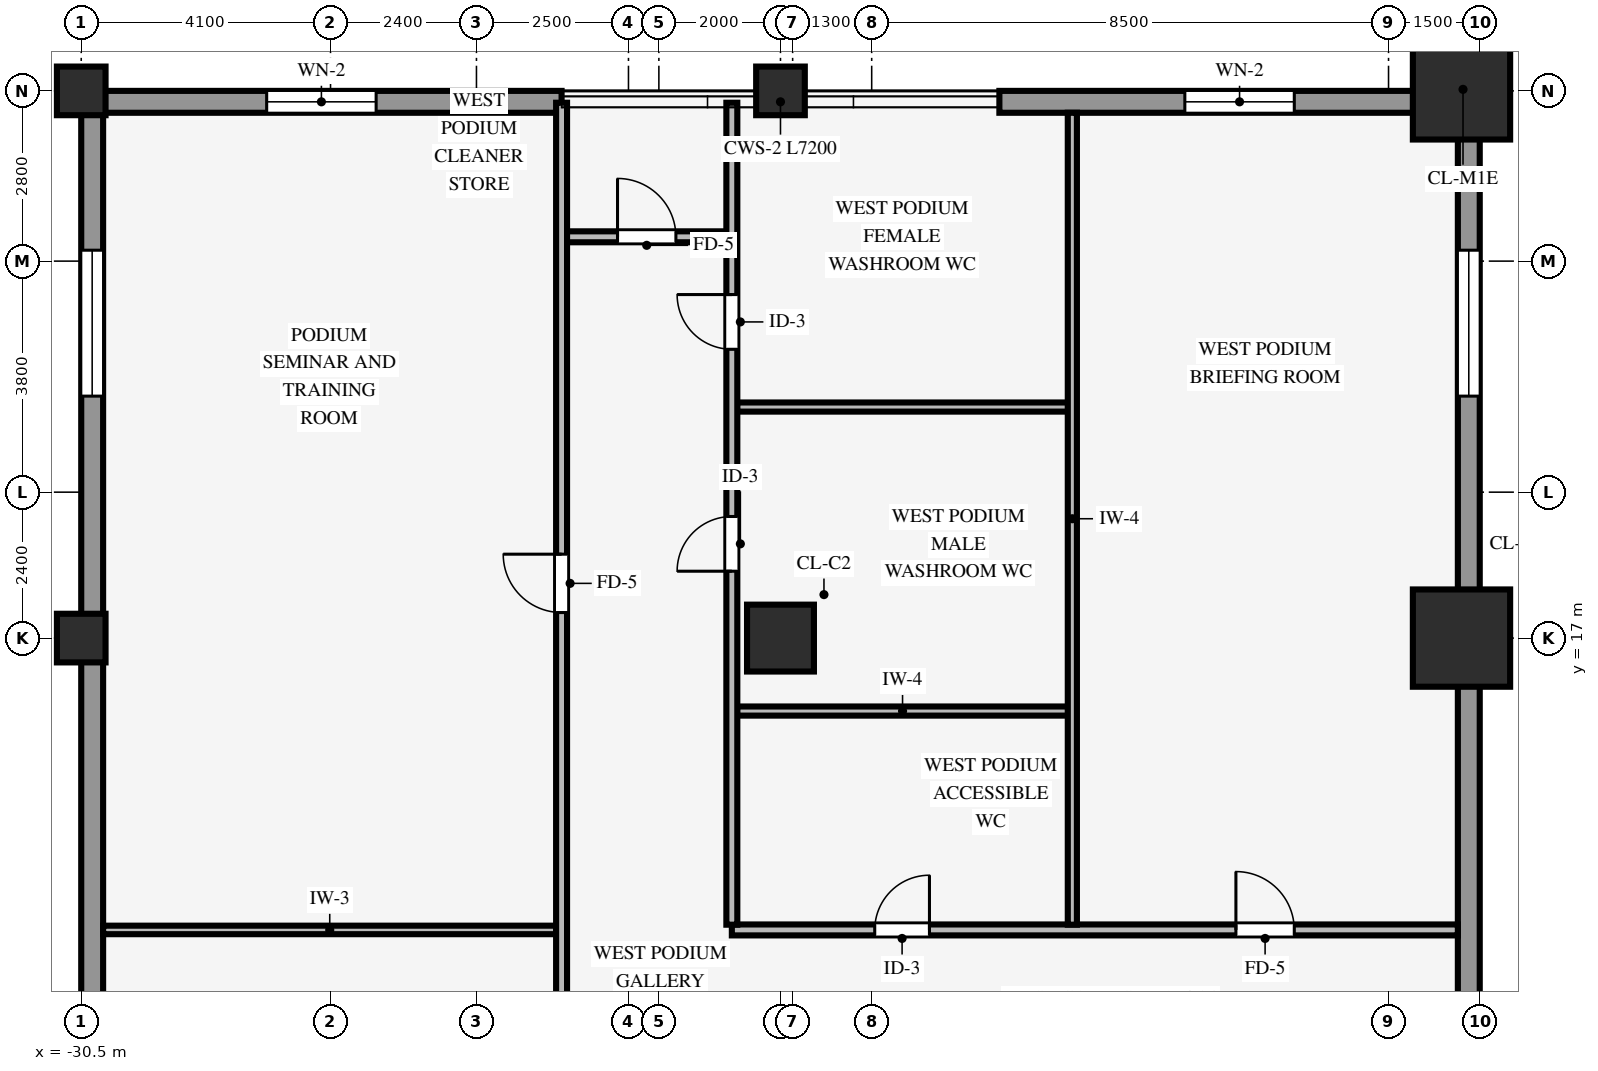
"""IFC4 building model, lengths in metres.
Left out: names, types, materials, properties, quantities, classifications, styles, units other than length and angle.
Written with IfcOpenShell. Run it as: python <this file> out.ifc"""

import sys

from ifc_helpers import new_model, si_unit, direction, frame, frame_2d, origin, origin_2d, place, context, subcontext, project, spatial, rectangle, hollow_rectangle, extrude, source, transform, mapped, element, fill, save


model = new_model("IFC4")
c1 = context("Model", 3, precision=1e-05, world=origin(), true_north=direction((0.0, 1.0)))
c2 = subcontext(c1, "Body", "Model", "MODEL_VIEW")
j1 = project(units=[si_unit("LENGTHUNIT", "METRE"), si_unit("PLANEANGLEUNIT", "RADIAN")], contexts=[c1])
p1 = place(None, origin())
s1 = spatial("IfcSite", under=j1, at=p1, CompositionType="ELEMENT")
p2 = place(p1, origin())
s2 = spatial("IfcBuilding", under=s1, at=p2, CompositionType="ELEMENT")
p3 = place(p2, frame((0.0, 0.0, 9.2)))
s3 = spatial("IfcBuildingStorey", under=s2, at=p3, CompositionType="ELEMENT", Elevation=9.2)
for number, where, z_axis, x_axis in (
    (1, (-7.8, 17.0, 0.0), (0.0, 0.0, 1.0), (1.0, 0.0, 0.0)),
    (2, (-7.8, 26.0, 0.0), (0.0, 0.0, 1.0), (1.0, 0.0, 0.0)),
):
    element("IfcColumn", number, at=place(p3, frame(where, z_axis=z_axis, x_axis=x_axis)), inside=s3, PredefinedType="COLUMN", context=c2, shape_type="SweptSolid", body=[
        extrude(rectangle(XDim=1.6, YDim=1.6, at=origin_2d()), origin(), (0.0, 0.0, 1.0), 4.28),
    ])
for number, where, z_axis, x_axis in (
    (3, (-30.5, 17.0, 0.0), (0.0, 0.0, 1.0), (1.0, 0.0, 0.0)),
    (4, (-30.5, 26.0, 0.0), (0.0, 0.0, 1.0), (1.0, 0.0, 0.0)),
):
    element("IfcColumn", number, at=place(p3, frame(where, z_axis=z_axis, x_axis=x_axis)), inside=s3, PredefinedType="COLUMN", context=c2, shape_type="SweptSolid", body=[
        extrude(hollow_rectangle(XDim=0.8, YDim=0.8, WallThickness=0.055, InnerFilletRadius=0.055, OuterFilletRadius=0.11, at=origin_2d()), origin(), (0.0, 0.0, 1.0), 4.28),
    ])
p4 = place(p3, frame((-19.0, 17.0, 0.0), z_axis=(0.0, 0.0, 1.0), x_axis=(1.0, 0.0, 0.0)))
e5 = element("IfcColumn", 5, at=p4, inside=s3, PredefinedType="COLUMN", context=c2, shape_type="SweptSolid", body=[
    extrude(rectangle(XDim=1.1, YDim=1.1, at=origin_2d()), origin(), (0.0, 0.0, 1.0), 4.28),
])
p5 = place(p3, frame((-19.0, 26.0, 0.0), z_axis=(0.0, 0.0, 1.0), x_axis=(1.0, 0.0, 0.0)))
e6 = element("IfcColumn", 6, at=p5, inside=s3, PredefinedType="COLUMN", context=c2, shape_type="SweptSolid", body=[
    extrude(hollow_rectangle(XDim=0.8, YDim=0.8, WallThickness=0.055, InnerFilletRadius=0.055, OuterFilletRadius=0.11, at=origin_2d()), origin(), (0.0, 0.0, 1.0), 4.28),
])
p6 = place(p3, frame((-7.68, -25.644, 0.0), z_axis=(0.0, 0.0, 1.0), x_axis=(0.0, 1.0, 0.0)))
e7 = element("IfcWall", 7, at=p6, inside=s3, PredefinedType="STANDARD", context=c2, shape_type="SweptSolid", body=[
    extrude(rectangle(XDim=51.288, YDim=0.36, at=frame_2d((25.644, 0.0))), origin(), (0.0, 0.0, 1.0), 3.649),
])
p7 = place(p6, frame((2.264, 0.0, 0.85)))
e8 = element("IfcOpeningElement", 8, at=p7, cuts=e7, PredefinedType="OPENING", context=c2, shape_type="SweptSolid", body=[
    extrude(rectangle(XDim=2.4, YDim=2.45, at=frame_2d((1.2, 1.225))), frame((0.0, 0.19, 0.0), z_axis=(0.0, -1.0, 0.0), x_axis=(1.0, 0.0, 0.0)), (0.0, 0.0, 1.0), 0.38),
])
p8 = place(p6, frame((17.051, 0.0, 0.85)))
e9 = element("IfcOpeningElement", 9, at=p8, cuts=e7, PredefinedType="OPENING", context=c2, shape_type="SweptSolid", body=[
    extrude(rectangle(XDim=2.4, YDim=2.45, at=frame_2d((1.2, 1.225))), frame((0.0, 0.19, 0.0), z_axis=(0.0, -1.0, 0.0), x_axis=(1.0, 0.0, 0.0)), (0.0, 0.0, 1.0), 0.38),
])
p9 = place(p6, frame((21.979, 0.0, 0.85)))
e10 = element("IfcOpeningElement", 10, at=p9, cuts=e7, PredefinedType="OPENING", context=c2, shape_type="SweptSolid", body=[
    extrude(rectangle(XDim=2.4, YDim=2.45, at=frame_2d((1.2, 1.225))), frame((0.0, 0.19, 0.0), z_axis=(0.0, -1.0, 0.0), x_axis=(1.0, 0.0, 0.0)), (0.0, 0.0, 1.0), 0.38),
])
p10 = place(p6, frame((26.908, 0.0, 0.85)))
e11 = element("IfcOpeningElement", 11, at=p10, cuts=e7, PredefinedType="OPENING", context=c2, shape_type="SweptSolid", body=[
    extrude(rectangle(XDim=2.4, YDim=2.45, at=frame_2d((1.2, 1.225))), frame((0.0, 0.19, 0.0), z_axis=(0.0, -1.0, 0.0), x_axis=(1.0, 0.0, 0.0)), (0.0, 0.0, 1.0), 0.38),
])
p11 = place(p6, frame((31.837, 0.0, 0.85)))
e12 = element("IfcOpeningElement", 12, at=p11, cuts=e7, PredefinedType="OPENING", context=c2, shape_type="SweptSolid", body=[
    extrude(rectangle(XDim=2.4, YDim=2.45, at=frame_2d((1.2, 1.225))), frame((0.0, 0.19, 0.0), z_axis=(0.0, -1.0, 0.0), x_axis=(1.0, 0.0, 0.0)), (0.0, 0.0, 1.0), 0.38),
])
p12 = place(p6, frame((46.624, 0.0, 0.85)))
e13 = element("IfcOpeningElement", 13, at=p12, cuts=e7, PredefinedType="OPENING", context=c2, shape_type="SweptSolid", body=[
    extrude(rectangle(XDim=2.4, YDim=2.45, at=frame_2d((1.2, 1.225))), frame((0.0, 0.19, 0.0), z_axis=(0.0, -1.0, 0.0), x_axis=(1.0, 0.0, 0.0)), (0.0, 0.0, 1.0), 0.38),
])
p13 = place(p3, frame((-30.5, 25.82, 0.0), z_axis=(0.0, 0.0, 1.0), x_axis=(1.0, 0.0, 0.0)))
e14 = element("IfcWall", 14, at=p13, inside=s3, PredefinedType="STANDARD", context=c2, shape_type="SweptSolid", body=[
    extrude(rectangle(XDim=7.9, YDim=0.36, at=frame_2d((3.95, 0.0))), origin(), (0.0, 0.0, 1.0), 3.615),
])
p14 = place(p13, frame((3.05, 0.0, 0.85)))
e15 = element("IfcOpeningElement", 15, at=p14, cuts=e14, PredefinedType="OPENING", context=c2, shape_type="SweptSolid", body=[
    extrude(rectangle(XDim=1.8, YDim=2.35, at=frame_2d((0.9, 1.175))), frame((0.0, 0.19, 0.0), z_axis=(0.0, -1.0, 0.0), x_axis=(1.0, 0.0, 0.0)), (0.0, 0.0, 1.0), 0.38),
])
p15 = place(p3, frame((-15.4, 25.82, 0.0), z_axis=(0.0, 0.0, 1.0), x_axis=(1.0, 0.0, 0.0)))
e16 = element("IfcWall", 16, at=p15, inside=s3, PredefinedType="STANDARD", context=c2, shape_type="SweptSolid", body=[
    extrude(rectangle(XDim=7.9, YDim=0.36, at=frame_2d((3.95, 0.0))), origin(), (0.0, 0.0, 1.0), 3.615),
])
p16 = place(p15, frame((3.05, 0.0, 0.85)))
e17 = element("IfcOpeningElement", 17, at=p16, cuts=e16, PredefinedType="OPENING", context=c2, shape_type="SweptSolid", body=[
    extrude(rectangle(XDim=1.8, YDim=2.35, at=frame_2d((0.9, 1.175))), frame((0.0, 0.19, 0.0), z_axis=(0.0, -1.0, 0.0), x_axis=(1.0, 0.0, 0.0)), (0.0, 0.0, 1.0), 0.38),
])
p17 = place(p3, frame((-30.32, -25.644, 0.0), z_axis=(0.0, 0.0, 1.0), x_axis=(0.0, 1.0, 0.0)))
e18 = element("IfcWall", 18, at=p17, inside=s3, PredefinedType="STANDARD", context=c2, shape_type="SweptSolid", body=[
    extrude(rectangle(XDim=51.288, YDim=0.36, at=frame_2d((25.644, 0.0))), origin(), (0.0, 0.0, 1.0), 3.615),
])
p18 = place(p17, frame((2.264, 0.0, 0.85)))
e19 = element("IfcOpeningElement", 19, at=p18, cuts=e18, PredefinedType="OPENING", context=c2, shape_type="SweptSolid", body=[
    extrude(rectangle(XDim=2.4, YDim=2.45, at=frame_2d((1.2, 1.225))), frame((0.0, 0.19, 0.0), z_axis=(0.0, -1.0, 0.0), x_axis=(1.0, 0.0, 0.0)), (0.0, 0.0, 1.0), 0.38),
])
p19 = place(p17, frame((17.051, 0.0, 0.85)))
e20 = element("IfcOpeningElement", 20, at=p19, cuts=e18, PredefinedType="OPENING", context=c2, shape_type="SweptSolid", body=[
    extrude(rectangle(XDim=2.4, YDim=2.45, at=frame_2d((1.2, 1.225))), frame((0.0, 0.19, 0.0), z_axis=(0.0, -1.0, 0.0), x_axis=(1.0, 0.0, 0.0)), (0.0, 0.0, 1.0), 0.38),
])
p20 = place(p17, frame((21.979, 0.0, 0.85)))
e21 = element("IfcOpeningElement", 21, at=p20, cuts=e18, PredefinedType="OPENING", context=c2, shape_type="SweptSolid", body=[
    extrude(rectangle(XDim=2.4, YDim=2.45, at=frame_2d((1.2, 1.225))), frame((0.0, 0.19, 0.0), z_axis=(0.0, -1.0, 0.0), x_axis=(1.0, 0.0, 0.0)), (0.0, 0.0, 1.0), 0.38),
])
p21 = place(p17, frame((26.908, 0.0, 0.85)))
e22 = element("IfcOpeningElement", 22, at=p21, cuts=e18, PredefinedType="OPENING", context=c2, shape_type="SweptSolid", body=[
    extrude(rectangle(XDim=2.4, YDim=2.45, at=frame_2d((1.2, 1.225))), frame((0.0, 0.19, 0.0), z_axis=(0.0, -1.0, 0.0), x_axis=(1.0, 0.0, 0.0)), (0.0, 0.0, 1.0), 0.38),
])
p22 = place(p17, frame((31.837, 0.0, 0.85)))
e23 = element("IfcOpeningElement", 23, at=p22, cuts=e18, PredefinedType="OPENING", context=c2, shape_type="SweptSolid", body=[
    extrude(rectangle(XDim=2.4, YDim=2.45, at=frame_2d((1.2, 1.225))), frame((0.0, 0.19, 0.0), z_axis=(0.0, -1.0, 0.0), x_axis=(1.0, 0.0, 0.0)), (0.0, 0.0, 1.0), 0.38),
])
p23 = place(p17, frame((46.624, 0.0, 0.85)))
e24 = element("IfcOpeningElement", 24, at=p23, cuts=e18, PredefinedType="OPENING", context=c2, shape_type="SweptSolid", body=[
    extrude(rectangle(XDim=2.4, YDim=2.45, at=frame_2d((1.2, 1.225))), frame((0.0, 0.19, 0.0), z_axis=(0.0, -1.0, 0.0), x_axis=(1.0, 0.0, 0.0)), (0.0, 0.0, 1.0), 0.38),
])
p24 = place(p3, frame((-30.14, 12.2, 0.0), z_axis=(0.0, 0.0, 1.0), x_axis=(1.0, 0.0, 0.0)))
e25 = element("IfcWall", 25, at=p24, inside=s3, PredefinedType="PARTITIONING", context=c2, shape_type="SweptSolid", body=[
    extrude(rectangle(XDim=7.454, YDim=0.14, at=frame_2d((3.727, 0.0))), origin(), (0.0, 0.0, 1.0), 4.27),
])
p25 = place(p3, frame((-19.8, 12.2, 0.0), z_axis=(0.0, 0.0, 1.0), x_axis=(1.0, 0.0, 0.0)))
e26 = element("IfcWall", 26, at=p25, inside=s3, PredefinedType="PARTITIONING", context=c2, shape_type="SweptSolid", body=[
    extrude(rectangle(XDim=11.94, YDim=0.18, at=frame_2d((5.97, 0.0))), origin(), (0.0, 0.0, 1.0), 4.27),
])
p26 = place(p25, frame((8.29, 0.0, 0.0)))
e27 = element("IfcOpeningElement", 27, at=p26, cuts=e26, PredefinedType="OPENING", context=c2, shape_type="SweptSolid", body=[
    extrude(rectangle(XDim=0.96, YDim=2.1, at=frame_2d((0.48, 1.05))), frame((0.0, 0.1, 0.0), z_axis=(0.0, -1.0, 0.0), x_axis=(1.0, 0.0, 0.0)), (0.0, 0.0, 1.0), 0.2),
])
p27 = place(p25, frame((2.35, 0.0, 0.0)))
e28 = element("IfcOpeningElement", 28, at=p27, cuts=e26, PredefinedType="OPENING", context=c2, shape_type="SweptSolid", body=[
    extrude(rectangle(XDim=0.9, YDim=2.1, at=frame_2d((0.45, 1.05))), frame((0.0, 0.1, 0.0), z_axis=(0.0, -1.0, 0.0), x_axis=(1.0, 0.0, 0.0)), (0.0, 0.0, 1.0), 0.2),
])
for number, where, z_axis, x_axis in (
    (29, (-19.714, 15.8, 0.0), (0.0, 0.0, 1.0), (1.0, 0.0, 0.0)),
    (30, (-19.714, 20.8, 0.0), (0.0, 0.0, 1.0), (1.0, 0.0, 0.0)),
):
    element("IfcWall", number, at=place(p3, frame(where, z_axis=z_axis, x_axis=x_axis)), inside=s3, PredefinedType="PARTITIONING", context=c2, shape_type="SweptSolid", body=[
        extrude(rectangle(XDim=5.443, YDim=0.15, at=frame_2d((2.722, 0.0))), origin(), (0.0, 0.0, 1.0), 4.27),
    ])
p28 = place(p3, frame((-22.514, 23.6, 0.0), z_axis=(0.0, 0.0, 1.0), x_axis=(1.0, 0.0, 0.0)))
e31 = element("IfcWall", 31, at=p28, inside=s3, PredefinedType="PARTITIONING", context=c2, shape_type="SweptSolid", body=[
    extrude(rectangle(XDim=2.628, YDim=0.18, at=frame_2d((1.314, 0.0))), origin(), (0.0, 0.0, 1.0), 4.27),
])
p29 = place(p28, frame((0.834, 0.0, 0.0)))
e32 = element("IfcOpeningElement", 32, at=p29, cuts=e31, PredefinedType="OPENING", context=c2, shape_type="SweptSolid", body=[
    extrude(rectangle(XDim=0.96, YDim=2.1, at=frame_2d((0.48, 1.05))), frame((0.0, 0.1, 0.0), z_axis=(0.0, -1.0, 0.0), x_axis=(1.0, 0.0, 0.0)), (0.0, 0.0, 1.0), 0.2),
])
p30 = place(p3, frame((-22.6, -12.114, 0.0), z_axis=(0.0, 0.0, 1.0), x_axis=(0.0, 1.0, 0.0)))
e33 = element("IfcWall", 33, at=p30, inside=s3, PredefinedType="PARTITIONING", context=c2, shape_type="SweptSolid", body=[
    extrude(rectangle(XDim=37.919, YDim=0.18, at=frame_2d((18.959, 0.0))), origin(), (0.0, 0.0, 1.0), 4.27),
])
p31 = place(p30, frame((11.634, 0.0, 0.0)))
e34 = element("IfcOpeningElement", 34, at=p31, cuts=e33, PredefinedType="OPENING", context=c2, shape_type="SweptSolid", body=[
    extrude(rectangle(XDim=0.96, YDim=2.1, at=frame_2d((0.48, 1.05))), frame((0.0, 0.1, 0.0), z_axis=(0.0, -1.0, 0.0), x_axis=(1.0, 0.0, 0.0)), (0.0, 0.0, 1.0), 0.2),
])
p32 = place(p30, frame((29.534, 0.0, 0.0)))
e35 = element("IfcOpeningElement", 35, at=p32, cuts=e33, PredefinedType="OPENING", context=c2, shape_type="SweptSolid", body=[
    extrude(rectangle(XDim=0.96, YDim=2.1, at=frame_2d((0.48, 1.05))), frame((0.0, 0.1, 0.0), z_axis=(0.0, -1.0, 0.0), x_axis=(1.0, 0.0, 0.0)), (0.0, 0.0, 1.0), 0.2),
])
p33 = place(p3, frame((-19.8, 12.286, 0.0), z_axis=(0.0, 0.0, 1.0), x_axis=(0.0, 1.0, 0.0)))
e36 = element("IfcWall", 36, at=p33, inside=s3, PredefinedType="PARTITIONING", context=c2, shape_type="SweptSolid", body=[
    extrude(rectangle(XDim=13.519, YDim=0.18, at=frame_2d((6.76, 0.0))), origin(), (0.0, 0.0, 1.0), 4.27),
])
p34 = place(p33, frame((5.814, 0.0, 0.0)))
e37 = element("IfcOpeningElement", 37, at=p34, cuts=e36, PredefinedType="OPENING", context=c2, shape_type="SweptSolid", body=[
    extrude(rectangle(XDim=0.9, YDim=2.1, at=frame_2d((0.45, 1.05))), frame((0.0, 0.1, 0.0), z_axis=(0.0, -1.0, 0.0), x_axis=(1.0, 0.0, 0.0)), (0.0, 0.0, 1.0), 0.2),
])
p35 = place(p33, frame((9.464, 0.0, 0.0)))
e38 = element("IfcOpeningElement", 38, at=p35, cuts=e36, PredefinedType="OPENING", context=c2, shape_type="SweptSolid", body=[
    extrude(rectangle(XDim=0.9, YDim=2.1, at=frame_2d((0.45, 1.05))), frame((0.0, 0.1, 0.0), z_axis=(0.0, -1.0, 0.0), x_axis=(1.0, 0.0, 0.0)), (0.0, 0.0, 1.0), 0.2),
])
p36 = place(p3, frame((-14.2, 12.286, 0.0), z_axis=(0.0, 0.0, 1.0), x_axis=(0.0, 1.0, 0.0)))
e39 = element("IfcWall", 39, at=p36, inside=s3, PredefinedType="PARTITIONING", context=c2, shape_type="SweptSolid", body=[
    extrude(rectangle(XDim=13.354, YDim=0.15, at=frame_2d((6.677, 0.0))), origin(), (0.0, 0.0, 1.0), 4.27),
])
m1 = source(origin(), c2, "Body", "SweptSolid", [
    extrude(rectangle(XDim=2.4, YDim=2.45, at=frame_2d((1.2, 1.225))), frame((0.0, 0.03, 0.0), z_axis=(0.0, -1.0, 0.0), x_axis=(1.0, 0.0, 0.0)), (0.0, 0.0, 1.0), 0.06),
])
p37 = place(p12, origin())
e40 = element("IfcWindow", 40, at=p37, inside=s3, PartitioningType="SINGLE_PANEL", PredefinedType="WINDOW", context=c2, shape_type="MappedRepresentation", body=[
    mapped(m1, transform((0.0, 0.0, 0.0), scale=1.0)),
])
fill(e13, e40)
m2 = source(origin(), c2, "Body", "SweptSolid", [
    extrude(rectangle(XDim=1.8, YDim=2.35, at=frame_2d((0.9, 1.175))), frame((0.0, 0.03, 0.0), z_axis=(0.0, -1.0, 0.0), x_axis=(1.0, 0.0, 0.0)), (0.0, 0.0, 1.0), 0.06),
])
p38 = place(p14, origin())
e41 = element("IfcWindow", 41, at=p38, inside=s3, PartitioningType="SINGLE_PANEL", PredefinedType="WINDOW", context=c2, shape_type="MappedRepresentation", body=[
    mapped(m2, transform((0.0, 0.0, 0.0), scale=1.0)),
])
fill(e15, e41)
p39 = place(p16, origin())
e42 = element("IfcWindow", 42, at=p39, inside=s3, PartitioningType="SINGLE_PANEL", PredefinedType="WINDOW", context=c2, shape_type="MappedRepresentation", body=[
    mapped(m2, transform((0.0, 0.0, 0.0), scale=1.0)),
])
fill(e17, e42)
p40 = place(p23, origin())
e43 = element("IfcWindow", 43, at=p40, inside=s3, PartitioningType="SINGLE_PANEL", PredefinedType="WINDOW", context=c2, shape_type="MappedRepresentation", body=[
    mapped(m1, transform((0.0, 0.0, 0.0), scale=1.0)),
])
fill(e24, e43)
m3 = source(origin(), c2, "Body", "SweptSolid", [
    extrude(rectangle(XDim=0.96, YDim=2.1, at=frame_2d((0.48, 1.05))), frame((0.0, 0.025, 0.0), z_axis=(0.0, -1.0, 0.0), x_axis=(1.0, 0.0, 0.0)), (0.0, 0.0, 1.0), 0.05),
])
p41 = place(p32, origin())
e44 = element("IfcDoor", 44, at=p41, inside=s3, OperationType="SINGLE_SWING_RIGHT", PredefinedType="DOOR", context=c2, shape_type="MappedRepresentation", body=[
    mapped(m3, transform((0.0, 0.0, 0.0), scale=1.0)),
])
fill(e35, e44)
p42 = place(p26, origin())
e45 = element("IfcDoor", 45, at=p42, inside=s3, OperationType="SINGLE_SWING_LEFT", PredefinedType="DOOR", context=c2, shape_type="MappedRepresentation", body=[
    mapped(m3, transform((0.0, 0.0, 0.0), scale=1.0)),
])
fill(e27, e45)
m4 = source(origin(), c2, "Body", "SweptSolid", [
    extrude(rectangle(XDim=0.9, YDim=2.1, at=frame_2d((0.45, 1.05))), frame((0.0, 0.025, 0.0), z_axis=(0.0, -1.0, 0.0), x_axis=(1.0, 0.0, 0.0)), (0.0, 0.0, 1.0), 0.05),
])
p43 = place(p27, origin())
e46 = element("IfcDoor", 46, at=p43, inside=s3, OperationType="SINGLE_SWING_RIGHT", PredefinedType="DOOR", context=c2, shape_type="MappedRepresentation", body=[
    mapped(m4, transform((0.0, 0.0, 0.0), scale=1.0)),
])
fill(e28, e46)
p44 = place(p34, origin())
e47 = element("IfcDoor", 47, at=p44, inside=s3, OperationType="SINGLE_SWING_LEFT", PredefinedType="DOOR", context=c2, shape_type="MappedRepresentation", body=[
    mapped(m4, transform((0.0, 0.0, 0.0), scale=1.0)),
])
fill(e37, e47)
p45 = place(p35, origin())
e48 = element("IfcDoor", 48, at=p45, inside=s3, OperationType="SINGLE_SWING_RIGHT", PredefinedType="DOOR", context=c2, shape_type="MappedRepresentation", body=[
    mapped(m4, transform((0.0, 0.0, 0.0), scale=1.0)),
])
fill(e38, e48)
p46 = place(p29, origin())
e49 = element("IfcDoor", 49, at=p46, inside=s3, OperationType="SINGLE_SWING_LEFT", PredefinedType="DOOR", context=c2, shape_type="MappedRepresentation", body=[
    mapped(m3, transform((0.0, 0.0, 0.0), scale=1.0)),
])
fill(e32, e49)
save(model, sys.argv[1])
